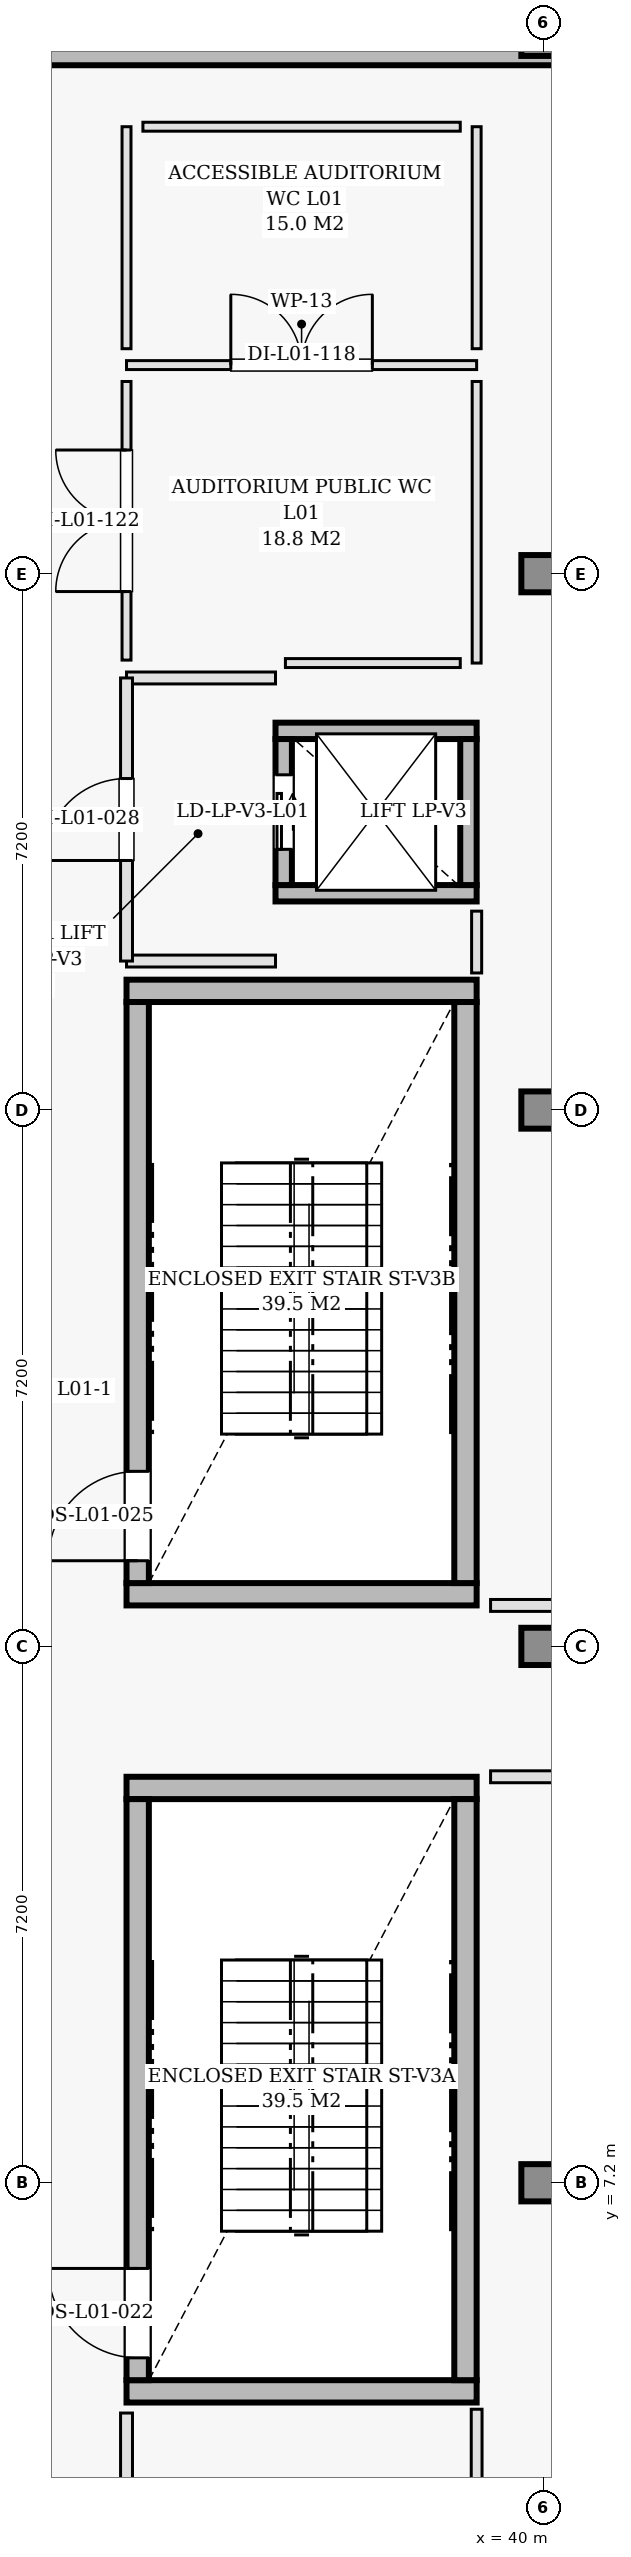
"""IFC4 building model, lengths in metres.
Left out: names, types, materials, properties, quantities, classifications, styles, units other than length and angle.
Written with IfcOpenShell. Run it as: python <this file> out.ifc"""

import sys

from ifc_helpers import new_model, si_unit, direction, frame, frame_2d, origin, origin_2d, place, context, subcontext, project, spatial, rectangle, extrude, element, fill, save


model = new_model("IFC4")
c1 = context("Model", 3, precision=1e-05, world=origin(), true_north=direction((0.0, 1.0)))
c2 = subcontext(c1, "Body", "Model", "MODEL_VIEW")
j1 = project(units=[si_unit("LENGTHUNIT", "METRE"), si_unit("PLANEANGLEUNIT", "RADIAN")], contexts=[c1])
p1 = place(None, origin())
s1 = spatial("IfcSite", under=j1, at=p1, CompositionType="ELEMENT")
p2 = place(p1, origin())
s2 = spatial("IfcBuilding", under=s1, at=p2, CompositionType="ELEMENT")
p3 = place(p2, frame((0.0, 0.0, 4.8)))
s3 = spatial("IfcBuildingStorey", under=s2, at=p3, CompositionType="ELEMENT", Elevation=4.8)
for number, where, z_axis, x_axis in (
    (1, (40.0, 7.2, 0.0), (0.0, 0.0, 1.0), (1.0, 0.0, 0.0)),
    (2, (40.0, 14.4, 0.0), (0.0, 0.0, 1.0), (1.0, 0.0, 0.0)),
    (3, (40.0, 21.6, 0.0), (0.0, 0.0, 1.0), (1.0, 0.0, 0.0)),
    (4, (40.0, 28.8, 0.0), (0.0, 0.0, 1.0), (1.0, 0.0, 0.0)),
    (5, (40.0, 36.0, 0.0), (0.0, 0.0, 1.0), (1.0, 0.0, 0.0)),
):
    element("IfcColumn", number, at=place(p3, frame(where, z_axis=z_axis, x_axis=x_axis)), inside=s3, PredefinedType="COLUMN", context=c2, shape_type="SweptSolid", body=[
        extrude(rectangle(XDim=0.5, YDim=0.5, at=origin_2d()), origin(), (0.0, 0.0, 1.0), 4.8),
    ])
p4 = place(p3, frame((47.75, 35.75, 0.0), z_axis=(0.0, 0.0, 1.0), x_axis=(-1.0, 0.0, 0.0)))
e6 = element("IfcWall", 6, at=p4, inside=s3, PredefinedType="SHEAR", context=c2, shape_type="SweptSolid", body=[
    extrude(rectangle(XDim=47.75, YDim=0.25, at=frame_2d((23.875, 0.0))), origin(), (0.0, 0.0, 1.0), 4.48),
])
for number, where, z_axis, x_axis in (
    (7, (34.4, 4.4, 0.0), (0.0, 0.0, 1.0), (1.0, 0.0, 0.0)),
    (8, (34.4, 12.5, 0.0), (0.0, 0.0, 1.0), (1.0, 0.0, 0.0)),
):
    element("IfcWall", number, at=place(p3, frame(where, z_axis=z_axis, x_axis=x_axis)), inside=s3, PredefinedType="SHEAR", context=c2, shape_type="SweptSolid", body=[
        extrude(rectangle(XDim=4.7, YDim=0.3, at=frame_2d((2.35, 0.0))), origin(), (0.0, 0.0, 1.0), 4.48),
    ])
p5 = place(p3, frame((34.55, 4.55, 0.0), z_axis=(0.0, 0.0, 1.0), x_axis=(0.0, 1.0, 0.0)))
e9 = element("IfcWall", 9, at=p5, inside=s3, PredefinedType="SHEAR", context=c2, shape_type="SweptSolid", body=[
    extrude(rectangle(XDim=7.8, YDim=0.3, at=frame_2d((3.9, 0.0))), origin(), (0.0, 0.0, 1.0), 4.48),
])
p6 = place(p5, frame((0.3, 0.0, 0.0)))
e10 = element("IfcOpeningElement", 10, at=p6, cuts=e9, PredefinedType="OPENING", context=c2, shape_type="SweptSolid", body=[
    extrude(rectangle(XDim=1.2, YDim=2.15, at=frame_2d((0.6, 1.075))), frame((0.0, 0.16, 0.0), z_axis=(0.0, -1.0, 0.0), x_axis=(1.0, 0.0, 0.0)), (0.0, 0.0, 1.0), 0.32),
])
p7 = place(p3, frame((38.95, 4.55, 0.0), z_axis=(0.0, 0.0, 1.0), x_axis=(0.0, 1.0, 0.0)))
e11 = element("IfcWall", 11, at=p7, inside=s3, PredefinedType="SHEAR", context=c2, shape_type="SweptSolid", body=[
    extrude(rectangle(XDim=7.8, YDim=0.3, at=frame_2d((3.9, 0.0))), origin(), (0.0, 0.0, 1.0), 4.48),
])
for number, where, z_axis, x_axis in (
    (12, (34.4, 15.1, 0.0), (0.0, 0.0, 1.0), (1.0, 0.0, 0.0)),
    (13, (34.4, 23.2, 0.0), (0.0, 0.0, 1.0), (1.0, 0.0, 0.0)),
):
    element("IfcWall", number, at=place(p3, frame(where, z_axis=z_axis, x_axis=x_axis)), inside=s3, PredefinedType="SHEAR", context=c2, shape_type="SweptSolid", body=[
        extrude(rectangle(XDim=4.7, YDim=0.3, at=frame_2d((2.35, 0.0))), origin(), (0.0, 0.0, 1.0), 4.48),
    ])
p8 = place(p3, frame((34.55, 15.25, 0.0), z_axis=(0.0, 0.0, 1.0), x_axis=(0.0, 1.0, 0.0)))
e14 = element("IfcWall", 14, at=p8, inside=s3, PredefinedType="SHEAR", context=c2, shape_type="SweptSolid", body=[
    extrude(rectangle(XDim=7.8, YDim=0.3, at=frame_2d((3.9, 0.0))), origin(), (0.0, 0.0, 1.0), 4.48),
])
p9 = place(p8, frame((0.3, 0.0, 0.0)))
e15 = element("IfcOpeningElement", 15, at=p9, cuts=e14, PredefinedType="OPENING", context=c2, shape_type="SweptSolid", body=[
    extrude(rectangle(XDim=1.2, YDim=2.15, at=frame_2d((0.6, 1.075))), frame((0.0, 0.16, 0.0), z_axis=(0.0, -1.0, 0.0), x_axis=(1.0, 0.0, 0.0)), (0.0, 0.0, 1.0), 0.32),
])
p10 = place(p3, frame((38.95, 15.25, 0.0), z_axis=(0.0, 0.0, 1.0), x_axis=(0.0, 1.0, 0.0)))
e16 = element("IfcWall", 16, at=p10, inside=s3, PredefinedType="SHEAR", context=c2, shape_type="SweptSolid", body=[
    extrude(rectangle(XDim=7.8, YDim=0.3, at=frame_2d((3.9, 0.0))), origin(), (0.0, 0.0, 1.0), 4.48),
])
for number, where, z_axis, x_axis in (
    (17, (36.4, 24.51, 0.0), (0.0, 0.0, 1.0), (1.0, 0.0, 0.0)),
    (18, (36.4, 26.69, 0.0), (0.0, 0.0, 1.0), (1.0, 0.0, 0.0)),
):
    element("IfcWall", number, at=place(p3, frame(where, z_axis=z_axis, x_axis=x_axis)), inside=s3, PredefinedType="SHEAR", context=c2, shape_type="SweptSolid", body=[
        extrude(rectangle(XDim=2.7, YDim=0.22, at=frame_2d((1.35, 0.0))), origin(), (0.0, 0.0, 1.0), 4.48),
    ])
p11 = place(p3, frame((36.51, 24.62, 0.0), z_axis=(0.0, 0.0, 1.0), x_axis=(0.0, 1.0, 0.0)))
e19 = element("IfcWall", 19, at=p11, inside=s3, PredefinedType="SHEAR", context=c2, shape_type="SweptSolid", body=[
    extrude(rectangle(XDim=1.96, YDim=0.22, at=frame_2d((0.98, 0.0))), origin(), (0.0, 0.0, 1.0), 4.48),
])
p12 = place(p11, frame((0.48, 0.0, 0.0)))
e20 = element("IfcOpeningElement", 20, at=p12, cuts=e19, PredefinedType="OPENING", context=c2, shape_type="SweptSolid", body=[
    extrude(rectangle(XDim=1.0, YDim=2.15, at=frame_2d((0.5, 1.075))), frame((0.0, 0.12, 0.0), z_axis=(0.0, -1.0, 0.0), x_axis=(1.0, 0.0, 0.0)), (0.0, 0.0, 1.0), 0.24),
])
p13 = place(p3, frame((38.99, 24.62, 0.0), z_axis=(0.0, 0.0, 1.0), x_axis=(0.0, 1.0, 0.0)))
e21 = element("IfcWall", 21, at=p13, inside=s3, PredefinedType="SHEAR", context=c2, shape_type="SweptSolid", body=[
    extrude(rectangle(XDim=1.96, YDim=0.22, at=frame_2d((0.98, 0.0))), origin(), (0.0, 0.0, 1.0), 4.48),
])
for number, where, z_axis, x_axis in (
    (22, (34.4, 23.6, 0.0), (0.0, 0.0, 1.0), (1.0, 0.0, 0.0)),
    (23, (34.4, 27.4, 0.0), (0.0, 0.0, 1.0), (1.0, 0.0, 0.0)),
):
    element("IfcWall", number, at=place(p3, frame(where, z_axis=z_axis, x_axis=x_axis)), inside=s3, PredefinedType="PARTITIONING", context=c2, shape_type="SweptSolid", body=[
        extrude(rectangle(XDim=2.0, YDim=0.16, at=frame_2d((1.0, 0.0))), origin(), (0.0, 0.0, 1.0), 4.48),
    ])
p14 = place(p3, frame((34.4, 23.6, 0.0), z_axis=(0.0, 0.0, 1.0), x_axis=(0.0, 1.0, 0.0)))
e24 = element("IfcWall", 24, at=p14, inside=s3, PredefinedType="PARTITIONING", context=c2, shape_type="SweptSolid", body=[
    extrude(rectangle(XDim=3.8, YDim=0.16, at=frame_2d((1.9, 0.0))), origin(), (0.0, 0.0, 1.0), 4.195),
])
p15 = place(p14, frame((1.35, 0.0, 0.0)))
e25 = element("IfcOpeningElement", 25, at=p15, cuts=e24, PredefinedType="OPENING", context=c2, shape_type="SweptSolid", body=[
    extrude(rectangle(XDim=1.1, YDim=2.15, at=frame_2d((0.55, 1.075))), frame((0.0, 0.09, 0.0), z_axis=(0.0, -1.0, 0.0), x_axis=(1.0, 0.0, 0.0)), (0.0, 0.0, 1.0), 0.18),
])
p16 = place(p3, frame((34.4, 31.6, 0.0), z_axis=(0.0, 0.0, 1.0), x_axis=(1.0, 0.0, 0.0)))
e26 = element("IfcWall", 26, at=p16, inside=s3, PredefinedType="PARTITIONING", context=c2, shape_type="SweptSolid", body=[
    extrude(rectangle(XDim=4.7, YDim=0.12, at=frame_2d((2.35, 0.0))), origin(), (0.0, 0.0, 1.0), 4.48),
])
p17 = place(p16, frame((1.4, 0.0, 0.0)))
e27 = element("IfcOpeningElement", 27, at=p17, cuts=e26, PredefinedType="OPENING", context=c2, shape_type="SweptSolid", body=[
    extrude(rectangle(XDim=1.9, YDim=2.25, at=frame_2d((0.95, 1.125))), frame((0.0, 0.07, 0.0), z_axis=(0.0, -1.0, 0.0), x_axis=(1.0, 0.0, 0.0)), (0.0, 0.0, 1.0), 0.14),
])
for number, where, z_axis, x_axis in (
    (28, (39.1, 31.82, 0.0), (0.0, 0.0, 1.0), (0.0, 1.0, 0.0)),
    (29, (34.4, 31.82, 0.0), (0.0, 0.0, 1.0), (0.0, 1.0, 0.0)),
):
    element("IfcWall", number, at=place(p3, frame(where, z_axis=z_axis, x_axis=x_axis)), inside=s3, PredefinedType="PARTITIONING", context=c2, shape_type="SweptSolid", body=[
        extrude(rectangle(XDim=2.98, YDim=0.12, at=frame_2d((1.49, 0.0))), origin(), (0.0, 0.0, 1.0), 4.48),
    ])
p18 = place(p3, frame((34.62, 34.8, 0.0), z_axis=(0.0, 0.0, 1.0), x_axis=(1.0, 0.0, 0.0)))
e30 = element("IfcWall", 30, at=p18, inside=s3, PredefinedType="PARTITIONING", context=c2, shape_type="SweptSolid", body=[
    extrude(rectangle(XDim=4.26, YDim=0.12, at=frame_2d((2.13, 0.0))), origin(), (0.0, 0.0, 1.0), 4.48),
])
p19 = place(p3, frame((39.1, 27.6, 0.0), z_axis=(0.0, 0.0, 1.0), x_axis=(0.0, 1.0, 0.0)))
e31 = element("IfcWall", 31, at=p19, inside=s3, PredefinedType="PARTITIONING", context=c2, shape_type="SweptSolid", body=[
    extrude(rectangle(XDim=3.78, YDim=0.12, at=frame_2d((1.89, 0.0))), origin(), (0.0, 0.0, 1.0), 3.865),
])
p20 = place(p3, frame((36.533, 27.6, 0.0), z_axis=(0.0, 0.0, 1.0), x_axis=(1.0, 0.0, 0.0)))
e32 = element("IfcWall", 32, at=p20, inside=s3, PredefinedType="PARTITIONING", context=c2, shape_type="SweptSolid", body=[
    extrude(rectangle(XDim=2.347, YDim=0.12, at=frame_2d((1.173, 0.0))), origin(), (0.0, 0.0, 1.0), 4.48),
])
p21 = place(p3, frame((34.4, 27.64, 0.0), z_axis=(0.0, 0.0, 1.0), x_axis=(0.0, 1.0, 0.0)))
e33 = element("IfcWall", 33, at=p21, inside=s3, PredefinedType="PARTITIONING", context=c2, shape_type="SweptSolid", body=[
    extrude(rectangle(XDim=3.74, YDim=0.12, at=frame_2d((1.87, 0.0))), origin(), (0.0, 0.0, 1.0), 3.865),
])
p22 = place(p21, frame((0.92, 0.0, 0.0)))
e34 = element("IfcOpeningElement", 34, at=p22, cuts=e33, PredefinedType="OPENING", context=c2, shape_type="SweptSolid", body=[
    extrude(rectangle(XDim=1.9, YDim=2.25, at=frame_2d((0.95, 1.125))), frame((0.0, 0.07, 0.0), z_axis=(0.0, -1.0, 0.0), x_axis=(1.0, 0.0, 0.0)), (0.0, 0.0, 1.0), 0.14),
])
p23 = place(p3, frame((39.287, 12.65, 0.0), z_axis=(0.0, 0.0, 1.0), x_axis=(1.0, 0.0, 0.0)))
e35 = element("IfcWall", 35, at=p23, inside=s3, PredefinedType="PARTITIONING", context=c2, shape_type="SweptSolid", body=[
    extrude(rectangle(XDim=8.408, YDim=0.16, at=frame_2d((4.204, 0.0))), origin(), (0.0, 0.0, 1.0), 3.915),
])
p24 = place(p23, frame((3.654, 0.0, 0.0)))
e36 = element("IfcOpeningElement", 36, at=p24, cuts=e35, PredefinedType="OPENING", context=c2, shape_type="SweptSolid", body=[
    extrude(rectangle(XDim=1.1, YDim=2.15, at=frame_2d((0.55, 1.075))), frame((0.0, 0.09, 0.0), z_axis=(0.0, -1.0, 0.0), x_axis=(1.0, 0.0, 0.0)), (0.0, 0.0, 1.0), 0.18),
])
p25 = place(p3, frame((39.1, 0.055, 0.0), z_axis=(0.0, 0.0, 1.0), x_axis=(0.0, 1.0, 0.0)))
e37 = element("IfcWall", 37, at=p25, inside=s3, PredefinedType="PARTITIONING", context=c2, shape_type="SweptSolid", body=[
    extrude(rectangle(XDim=4.105, YDim=0.145, at=frame_2d((2.052, 0.0))), origin(), (0.0, 0.0, 1.0), 3.865),
])
p26 = place(p3, frame((39.287, 14.95, 0.0), z_axis=(0.0, 0.0, 1.0), x_axis=(1.0, 0.0, 0.0)))
e38 = element("IfcWall", 38, at=p26, inside=s3, PredefinedType="PARTITIONING", context=c2, shape_type="SweptSolid", body=[
    extrude(rectangle(XDim=8.408, YDim=0.16, at=frame_2d((4.204, 0.0))), origin(), (0.0, 0.0, 1.0), 3.915),
])
p27 = place(p26, frame((3.254, 0.0, 0.0)))
e39 = element("IfcOpeningElement", 39, at=p27, cuts=e38, PredefinedType="OPENING", context=c2, shape_type="SweptSolid", body=[
    extrude(rectangle(XDim=1.9, YDim=2.25, at=frame_2d((0.95, 1.125))), frame((0.0, 0.09, 0.0), z_axis=(0.0, -1.0, 0.0), x_axis=(1.0, 0.0, 0.0)), (0.0, 0.0, 1.0), 0.18),
])
p28 = place(p3, frame((39.1, 23.44, 0.0), z_axis=(0.0, 0.0, 1.0), x_axis=(0.0, 1.0, 0.0)))
e40 = element("IfcWall", 40, at=p28, inside=s3, PredefinedType="PARTITIONING", context=c2, shape_type="SweptSolid", body=[
    extrude(rectangle(XDim=0.83, YDim=0.135, at=frame_2d((0.415, 0.0))), origin(), (0.0, 0.0, 1.0), 4.195),
])
p29 = place(p3, frame((34.4, 0.055, 0.0), z_axis=(0.0, 0.0, 1.0), x_axis=(0.0, 1.0, 0.0)))
e41 = element("IfcWall", 41, at=p29, inside=s3, PredefinedType="PARTITIONING", context=c2, shape_type="SweptSolid", body=[
    extrude(rectangle(XDim=4.054, YDim=0.16, at=frame_2d((2.027, 0.0))), origin(), (0.0, 0.0, 1.0), 3.865),
])
p30 = place(p6, origin())
e42 = element("IfcDoor", 42, at=p30, inside=s3, OperationType="SINGLE_SWING_RIGHT", PredefinedType="DOOR", context=c2, shape_type="SweptSolid", body=[
    extrude(rectangle(XDim=1.2, YDim=2.15, at=frame_2d((0.6, 1.075))), frame((0.0, 0.025, 0.0), z_axis=(0.0, -1.0, 0.0), x_axis=(1.0, 0.0, 0.0)), (0.0, 0.0, 1.0), 0.05),
])
fill(e10, e42)
p31 = place(p9, origin())
e43 = element("IfcDoor", 43, at=p31, inside=s3, OperationType="SINGLE_SWING_LEFT", PredefinedType="DOOR", context=c2, shape_type="SweptSolid", body=[
    extrude(rectangle(XDim=1.2, YDim=2.15, at=frame_2d((0.6, 1.075))), frame((0.0, 0.025, 0.0), z_axis=(0.0, -1.0, 0.0), x_axis=(1.0, 0.0, 0.0)), (0.0, 0.0, 1.0), 0.05),
])
fill(e15, e43)
p32 = place(p12, origin())
e44 = element("IfcDoor", 44, at=p32, inside=s3, OperationType="SLIDING_TO_LEFT", PredefinedType="DOOR", context=c2, shape_type="SweptSolid", body=[
    extrude(rectangle(XDim=1.0, YDim=2.15, at=frame_2d((0.5, 1.075))), frame((0.0, 0.025, 0.0), z_axis=(0.0, -1.0, 0.0), x_axis=(1.0, 0.0, 0.0)), (0.0, 0.0, 1.0), 0.05),
])
fill(e20, e44)
p33 = place(p15, origin())
e45 = element("IfcDoor", 45, at=p33, inside=s3, OperationType="SINGLE_SWING_LEFT", PredefinedType="DOOR", context=c2, shape_type="SweptSolid", body=[
    extrude(rectangle(XDim=1.1, YDim=2.15, at=frame_2d((0.55, 1.075))), frame((0.0, 0.025, 0.0), z_axis=(0.0, -1.0, 0.0), x_axis=(1.0, 0.0, 0.0)), (0.0, 0.0, 1.0), 0.05),
])
fill(e25, e45)
p34 = place(p17, origin())
e46 = element("IfcDoor", 46, at=p34, inside=s3, OperationType="DOUBLE_DOOR_SINGLE_SWING", PredefinedType="DOOR", context=c2, shape_type="SweptSolid", body=[
    extrude(rectangle(XDim=1.9, YDim=2.25, at=frame_2d((0.95, 1.125))), frame((0.0, 0.025, 0.0), z_axis=(0.0, -1.0, 0.0), x_axis=(1.0, 0.0, 0.0)), (0.0, 0.0, 1.0), 0.05),
])
fill(e27, e46)
p35 = place(p22, origin())
e47 = element("IfcDoor", 47, at=p35, inside=s3, OperationType="DOUBLE_DOOR_SINGLE_SWING", PredefinedType="DOOR", context=c2, shape_type="SweptSolid", body=[
    extrude(rectangle(XDim=1.9, YDim=2.25, at=frame_2d((0.95, 1.125))), frame((0.0, 0.025, 0.0), z_axis=(0.0, -1.0, 0.0), x_axis=(1.0, 0.0, 0.0)), (0.0, 0.0, 1.0), 0.05),
])
fill(e34, e47)
save(model, sys.argv[1])
